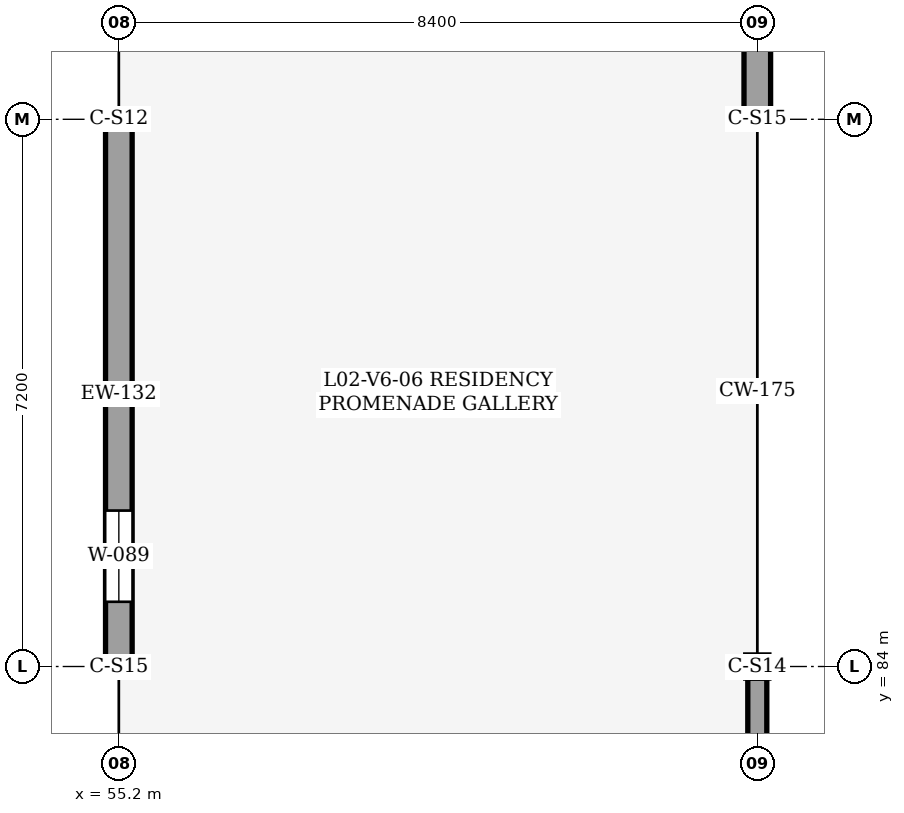
"""IFC4 building model, lengths in metres.
Left out: names, types, materials, properties, quantities, classifications, styles, units other than length and angle.
Written with IfcOpenShell. Run it as: python <this file> out.ifc"""

import sys

from ifc_helpers import new_model, si_unit, direction, frame, frame_2d, origin, origin_2d, place, context, subcontext, project, spatial, rectangle, hollow_rectangle, extrude, element, fill, save


model = new_model("IFC4")
c1 = context("Model", 3, precision=1e-05, world=origin(), true_north=direction((0.0, 1.0)))
c2 = subcontext(c1, "Body", "Model", "MODEL_VIEW")
j1 = project(units=[si_unit("LENGTHUNIT", "METRE"), si_unit("PLANEANGLEUNIT", "RADIAN")], contexts=[c1])
p1 = place(None, origin())
s1 = spatial("IfcSite", under=j1, at=p1, CompositionType="ELEMENT")
p2 = place(p1, origin())
s2 = spatial("IfcBuilding", under=s1, at=p2, CompositionType="ELEMENT")
p3 = place(p2, frame((0.0, 0.0, 10.2)))
s3 = spatial("IfcBuildingStorey", under=s2, at=p3, CompositionType="ELEMENT", Elevation=10.2)
p4 = place(p3, frame((55.2, 84.0, 0.0), z_axis=(0.0, 0.0, 1.0), x_axis=(1.0, 0.0, 0.0)))
e1 = element("IfcColumn", 1, at=p4, inside=s3, PredefinedType="COLUMN", context=c2, shape_type="SweptSolid", body=[
    extrude(hollow_rectangle(XDim=0.203, YDim=0.203, WallThickness=0.013, OuterFilletRadius=0.025, at=origin_2d()), origin(), (0.0, 0.0, 1.0), 4.8),
])
p5 = place(p3, frame((55.2, 91.2, 0.0), z_axis=(0.0, 0.0, 1.0), x_axis=(1.0, 0.0, 0.0)))
e2 = element("IfcColumn", 2, at=p5, inside=s3, PredefinedType="COLUMN", context=c2, shape_type="SweptSolid", body=[
    extrude(hollow_rectangle(XDim=0.254, YDim=0.254, WallThickness=0.013, OuterFilletRadius=0.025, at=origin_2d()), origin(), (0.0, 0.0, 1.0), 4.8),
])
p6 = place(p3, frame((63.6, 84.0, 0.0), z_axis=(0.0, 0.0, 1.0), x_axis=(1.0, 0.0, 0.0)))
e3 = element("IfcColumn", 3, at=p6, inside=s3, PredefinedType="COLUMN", context=c2, shape_type="SweptSolid", body=[
    extrude(hollow_rectangle(XDim=0.305, YDim=0.305, WallThickness=0.016, OuterFilletRadius=0.032, at=origin_2d()), origin(), (0.0, 0.0, 1.0), 4.8),
])
p7 = place(p3, frame((63.6, 91.2, 0.0), z_axis=(0.0, 0.0, 1.0), x_axis=(1.0, 0.0, 0.0)))
e4 = element("IfcColumn", 4, at=p7, inside=s3, PredefinedType="COLUMN", context=c2, shape_type="SweptSolid", body=[
    extrude(hollow_rectangle(XDim=0.203, YDim=0.203, WallThickness=0.013, OuterFilletRadius=0.025, at=origin_2d()), origin(), (0.0, 0.0, 1.0), 4.8),
])
p8 = place(p3, frame((55.2, 84.102, 0.0), z_axis=(0.0, 0.0, 1.0), x_axis=(0.0, 1.0, 0.0)))
e5 = element("IfcWall", 5, at=p8, inside=s3, PredefinedType="SOLIDWALL", context=c2, shape_type="SweptSolid", body=[
    extrude(rectangle(XDim=6.971, YDim=0.35, at=frame_2d((3.486, 0.0))), origin(), (0.0, 0.0, 1.0), 4.007),
])
p9 = place(p8, frame((0.75, 0.0, 0.9)))
e6 = element("IfcOpeningElement", 6, at=p9, cuts=e5, PredefinedType="OPENING", context=c2, shape_type="SweptSolid", body=[
    extrude(rectangle(XDim=1.2, YDim=1.5, at=frame_2d((0.6, 0.75))), frame((0.0, 0.185, 0.0), z_axis=(0.0, -1.0, 0.0), x_axis=(1.0, 0.0, 0.0)), (0.0, 0.0, 1.0), 0.371),
])
p10 = place(p3, frame((63.6, 83.848, 0.0), z_axis=(0.0, 0.0, 1.0), x_axis=(0.0, -1.0, 0.0)))
e7 = element("IfcWall", 7, at=p10, inside=s3, PredefinedType="SOLIDWALL", context=c2, shape_type="SweptSolid", body=[
    extrude(rectangle(XDim=6.895, YDim=0.25, at=frame_2d((3.448, 0.0))), origin(), (0.0, 0.0, 1.0), 4.007),
])
p11 = place(p10, frame((0.75, 0.0, 0.9)))
e8 = element("IfcOpeningElement", 8, at=p11, cuts=e7, PredefinedType="OPENING", context=c2, shape_type="SweptSolid", body=[
    extrude(rectangle(XDim=1.2, YDim=1.5, at=frame_2d((0.6, 0.75))), frame((0.0, 0.135, 0.0), z_axis=(0.0, -1.0, 0.0), x_axis=(1.0, 0.0, 0.0)), (0.0, 0.0, 1.0), 0.271),
])
p12 = place(p3, frame((63.6, 98.273, 0.0), z_axis=(0.0, 0.0, 1.0), x_axis=(0.0, -1.0, 0.0)))
e9 = element("IfcWall", 9, at=p12, inside=s3, PredefinedType="SOLIDWALL", context=c2, shape_type="SweptSolid", body=[
    extrude(rectangle(XDim=6.971, YDim=0.35, at=frame_2d((3.486, 0.0))), origin(), (0.0, 0.0, 1.0), 3.928),
])
p13 = place(p12, frame((0.75, 0.0, 0.9)))
e10 = element("IfcOpeningElement", 10, at=p13, cuts=e9, PredefinedType="OPENING", context=c2, shape_type="SweptSolid", body=[
    extrude(rectangle(XDim=1.2, YDim=1.5, at=frame_2d((0.6, 0.75))), frame((0.0, 0.185, 0.0), z_axis=(0.0, -1.0, 0.0), x_axis=(1.0, 0.0, 0.0)), (0.0, 0.0, 1.0), 0.371),
])
p14 = place(p9, origin())
e11 = element("IfcWindow", 11, at=p14, inside=s3, PartitioningType="SINGLE_PANEL", PredefinedType="WINDOW", context=c2, shape_type="SweptSolid", body=[
    extrude(rectangle(XDim=1.2, YDim=1.5, at=frame_2d((0.6, 0.75))), frame((0.0, 0.03, 0.0), z_axis=(0.0, -1.0, 0.0), x_axis=(1.0, 0.0, 0.0)), (0.0, 0.0, 1.0), 0.06),
])
fill(e6, e11)
save(model, sys.argv[1])
